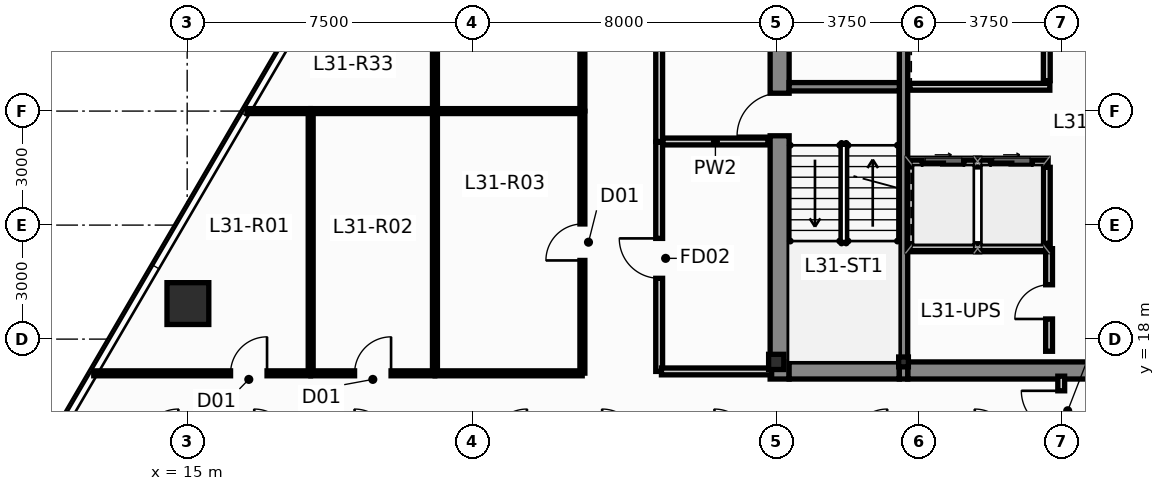
"""IFC4 building model, lengths in metres.
Left out: names, types, materials, properties, quantities, classifications, styles, units other than length and angle.
Written with IfcOpenShell. Run it as: python <this file> out.ifc"""

import sys

from ifc_helpers import new_model, si_unit, direction, frame, frame_2d, origin, origin_2d, place, context, subcontext, project, spatial, rectangle, hollow_rectangle, i_section, extrude, source, transform, mapped, element, fill, save


model = new_model("IFC4")
c1 = context("Model", 3, precision=1e-05, world=origin(), true_north=direction((0.0, 1.0)))
c2 = subcontext(c1, "Body", "Model", "MODEL_VIEW")
j1 = project(units=[si_unit("LENGTHUNIT", "METRE"), si_unit("PLANEANGLEUNIT", "RADIAN")], contexts=[c1])
p1 = place(None, origin())
s1 = spatial("IfcSite", under=j1, at=p1, CompositionType="ELEMENT")
p2 = place(p1, origin())
s2 = spatial("IfcBuilding", under=s1, at=p2, CompositionType="ELEMENT")
p3 = place(p2, frame((0.0, 0.0, 120.0)))
s3 = spatial("IfcBuildingStorey", under=s2, at=p3, CompositionType="ELEMENT", Elevation=120.0)
m1 = source(origin(), c2, "Body", "SweptSolid", [
    extrude(i_section(OverallWidth=0.4, OverallDepth=0.4, WebThickness=0.02, FlangeThickness=0.032, at=origin_2d()), origin(), (0.0, 0.0, 1.0), 3.65),
])
p4 = place(p3, frame((30.5, 17.4, 0.0), z_axis=(0.0, 0.0, 1.0), x_axis=(1.0, 0.0, 0.0)))
e1 = element("IfcColumn", 1, at=p4, inside=s3, PredefinedType="COLUMN", context=c2, shape_type="MappedRepresentation", body=[
    mapped(m1, transform((0.0, 0.0, 0.0), scale=1.0)),
])
m2 = source(origin(), c2, "Body", "SweptSolid", [
    extrude(i_section(OverallWidth=0.256, OverallDepth=0.26, WebThickness=0.01, FlangeThickness=0.017, at=origin_2d()), origin(), (0.0, 0.0, 1.0), 3.65),
])
p5 = place(p3, frame((33.85, 17.4, 0.0), z_axis=(0.0, 0.0, 1.0), x_axis=(1.0, 0.0, 0.0)))
e2 = element("IfcColumn", 2, at=p5, inside=s3, PredefinedType="COLUMN", context=c2, shape_type="MappedRepresentation", body=[
    mapped(m2, transform((0.0, 0.0, 0.0), scale=1.0)),
])
p6 = place(p3, frame((30.59, 16.95, 0.0), z_axis=(0.0, 0.0, 1.0), x_axis=(0.0, 1.0, 0.0)))
e3 = element("IfcWall", 3, at=p6, inside=s3, PredefinedType="SHEAR", context=c2, shape_type="SweptSolid", body=[
    extrude(rectangle(XDim=13.275, YDim=0.5, at=frame_2d((6.638, 0.0))), origin(), (0.0, 0.0, 1.0), 3.65),
])
p7 = place(p6, frame((6.4, 0.0, 0.0)))
e4 = element("IfcOpeningElement", 4, at=p7, cuts=e3, PredefinedType="OPENING", context=c2, shape_type="SweptSolid", body=[
    extrude(rectangle(XDim=1.12, YDim=2.15, at=frame_2d((0.56, 1.075))), frame((0.0, 0.262, 0.0), z_axis=(0.0, -1.0, 0.0), x_axis=(1.0, 0.0, 0.0)), (0.0, 0.0, 1.0), 0.524),
])
p8 = place(p6, frame((10.85, 0.0, 0.0)))
e5 = element("IfcOpeningElement", 5, at=p8, cuts=e3, PredefinedType="OPENING", context=c2, shape_type="SweptSolid", body=[
    extrude(rectangle(XDim=1.2, YDim=2.2, at=frame_2d((0.6, 1.1))), frame((0.0, 0.262, 0.0), z_axis=(0.0, -1.0, 0.0), x_axis=(1.0, 0.0, 0.0)), (0.0, 0.0, 1.0), 0.524),
])
p9 = place(p3, frame((30.84, 17.175, 0.0), z_axis=(0.0, 0.0, 1.0), x_axis=(1.0, 0.0, 0.0)))
e6 = element("IfcWall", 6, at=p9, inside=s3, PredefinedType="SHEAR", context=c2, shape_type="SweptSolid", body=[
    extrude(rectangle(XDim=2.9, YDim=0.45, at=frame_2d((1.45, 0.0))), origin(), (0.0, 0.0, 1.0), 3.65),
])
p10 = place(p3, frame((33.96, 17.175, 0.0), z_axis=(0.0, 0.0, 1.0), x_axis=(1.0, 0.0, 0.0)))
e7 = element("IfcWall", 7, at=p10, inside=s3, PredefinedType="SHEAR", context=c2, shape_type="SweptSolid", body=[
    extrude(rectangle(XDim=8.08, YDim=0.45, at=frame_2d((4.04, 0.0))), origin(), (0.0, 0.0, 1.0), 3.65),
])
p11 = place(p3, frame((33.85, 16.95, 0.0), z_axis=(0.0, 0.0, 1.0), x_axis=(0.0, 1.0, 0.0)))
e8 = element("IfcWall", 8, at=p11, inside=s3, PredefinedType="SHEAR", context=c2, shape_type="SweptSolid", body=[
    extrude(rectangle(XDim=13.275, YDim=0.22, at=frame_2d((6.638, 0.0))), origin(), (0.0, 0.0, 1.0), 3.65),
])
p12 = place(p3, frame((30.84, 24.64, 0.0), z_axis=(0.0, 0.0, 1.0), x_axis=(1.0, 0.0, 0.0)))
e9 = element("IfcWall", 9, at=p12, inside=s3, PredefinedType="SHEAR", context=c2, shape_type="SweptSolid", body=[
    extrude(rectangle(XDim=2.9, YDim=0.22, at=frame_2d((1.45, 0.0))), origin(), (0.0, 0.0, 1.0), 3.65),
])
m3 = source(origin(), c2, "Body", "SweptSolid", [
    extrude(hollow_rectangle(XDim=1.1, YDim=1.1, WallThickness=0.06, at=origin_2d()), origin(), (0.0, 0.0, 1.0), 3.651),
])
p13 = place(p3, frame((15.019, 18.935, 0.0), z_axis=(0.010431780378, -0.021599135014, 0.999712286273), x_axis=(0.900476348161, 0.434904985489, 0.0)))
e10 = element("IfcColumn", 10, at=p13, inside=s3, PredefinedType="COLUMN", context=c2, shape_type="MappedRepresentation", body=[
    mapped(m3, transform((0.0, 0.0, 0.0), scale=1.0)),
])
p14 = place(p3, frame((34.02, 22.62, 0.0), z_axis=(0.0, 0.0, 1.0), x_axis=(1.0, 0.0, 0.0)))
e11 = element("IfcWall", 11, at=p14, inside=s3, PredefinedType="PARTITIONING", context=c2, shape_type="SweptSolid", body=[
    extrude(rectangle(XDim=3.6, YDim=0.18, at=frame_2d((1.8, 0.0))), origin(), (0.0, 0.0, 1.0), 3.4),
])
p15 = place(p14, frame((0.32, 0.0, 0.0)))
e12 = element("IfcOpeningElement", 12, at=p15, cuts=e11, PredefinedType="OPENING", context=c2, shape_type="SweptSolid", body=[
    extrude(rectangle(XDim=1.1, YDim=2.2, at=frame_2d((0.55, 1.1))), frame((0.0, 0.102, 0.0), z_axis=(0.0, -1.0, 0.0), x_axis=(1.0, 0.0, 0.0)), (0.0, 0.0, 1.0), 0.204),
])
p16 = place(p14, frame((2.12, 0.0, 0.0)))
e13 = element("IfcOpeningElement", 13, at=p16, cuts=e11, PredefinedType="OPENING", context=c2, shape_type="SweptSolid", body=[
    extrude(rectangle(XDim=1.1, YDim=2.2, at=frame_2d((0.55, 1.1))), frame((0.0, 0.102, 0.0), z_axis=(0.0, -1.0, 0.0), x_axis=(1.0, 0.0, 0.0)), (0.0, 0.0, 1.0), 0.204),
])
for number, where, z_axis, x_axis in (
    (14, (37.62, 20.52, 0.0), (0.0, 0.0, 1.0), (0.0, 1.0, 0.0)),
    (15, (37.62, 24.8, 0.0), (0.0, 0.0, 1.0), (0.0, 1.0, 0.0)),
):
    element("IfcWall", number, at=place(p3, frame(where, z_axis=z_axis, x_axis=x_axis)), inside=s3, PredefinedType="PARTITIONING", context=c2, shape_type="SweptSolid", body=[
        extrude(rectangle(XDim=2.0, YDim=0.18, at=frame_2d((1.0, 0.0))), origin(), (0.0, 0.0, 1.0), 3.4),
    ])
p17 = place(p3, frame((34.02, 24.64, 0.0), z_axis=(0.0, 0.0, 1.0), x_axis=(1.0, 0.0, 0.0)))
e16 = element("IfcWall", 16, at=p17, inside=s3, PredefinedType="PARTITIONING", context=c2, shape_type="SweptSolid", body=[
    extrude(rectangle(XDim=3.68, YDim=0.18, at=frame_2d((1.84, 0.0))), origin(), (0.0, 0.0, 1.0), 3.4),
])
p18 = place(p3, frame((27.42, 23.2, 0.0), z_axis=(0.0, 0.0, 1.0), x_axis=(0.0, 1.0, 0.0)))
e17 = element("IfcWall", 17, at=p18, inside=s3, PredefinedType="PARTITIONING", context=c2, shape_type="SweptSolid", body=[
    extrude(rectangle(XDim=6.4, YDim=0.18, at=frame_2d((3.2, 0.0))), origin(), (0.0, 0.0, 1.0), 3.026),
])
p19 = place(p18, frame((2.65, 0.0, 0.0)))
e18 = element("IfcOpeningElement", 18, at=p19, cuts=e17, PredefinedType="OPENING", context=c2, shape_type="SweptSolid", body=[
    extrude(rectangle(XDim=1.05, YDim=2.15, at=frame_2d((0.525, 1.075))), frame((0.0, 0.102, 0.0), z_axis=(0.0, -1.0, 0.0), x_axis=(1.0, 0.0, 0.0)), (0.0, 0.0, 1.0), 0.204),
])
p20 = place(p3, frame((27.52, 23.2, 0.0), z_axis=(0.0, 0.0, 1.0), x_axis=(1.0, 0.0, 0.0)))
e19 = element("IfcWall", 19, at=p20, inside=s3, PredefinedType="PARTITIONING", context=c2, shape_type="SweptSolid", body=[
    extrude(rectangle(XDim=2.76, YDim=0.18, at=frame_2d((1.38, 0.0))), origin(), (0.0, 0.0, 1.0), 3.4),
])
p21 = place(p3, frame((34.02, 20.42, 0.0), z_axis=(0.0, 0.0, 1.0), x_axis=(1.0, 0.0, 0.0)))
e20 = element("IfcWall", 20, at=p21, inside=s3, PredefinedType="PARTITIONING", context=c2, shape_type="SweptSolid", body=[
    extrude(rectangle(XDim=3.64, YDim=0.18, at=frame_2d((1.82, 0.0))), origin(), (0.0, 0.0, 1.0), 3.4),
])
p22 = place(p3, frame((37.68, 17.68, 0.0), z_axis=(0.0, 0.0, 1.0), x_axis=(0.0, 1.0, 0.0)))
e21 = element("IfcWall", 21, at=p22, inside=s3, PredefinedType="PARTITIONING", context=c2, shape_type="SweptSolid", body=[
    extrude(rectangle(XDim=2.7, YDim=0.18, at=frame_2d((1.35, 0.0))), origin(), (0.0, 0.0, 1.0), 3.4),
])
p23 = place(p22, frame((0.85, 0.0, 0.0)))
e22 = element("IfcOpeningElement", 22, at=p23, cuts=e21, PredefinedType="OPENING", context=c2, shape_type="SweptSolid", body=[
    extrude(rectangle(XDim=0.9, YDim=2.1, at=frame_2d((0.45, 1.05))), frame((0.0, 0.102, 0.0), z_axis=(0.0, -1.0, 0.0), x_axis=(1.0, 0.0, 0.0)), (0.0, 0.0, 1.0), 0.204),
])
p24 = place(p3, frame((27.42, 17.15, 0.0), z_axis=(0.0, 0.0, 1.0), x_axis=(0.0, 1.0, 0.0)))
e23 = element("IfcWall", 23, at=p24, inside=s3, PredefinedType="PARTITIONING", context=c2, shape_type="SweptSolid", body=[
    extrude(rectangle(XDim=6.03, YDim=0.18, at=frame_2d((3.015, 0.0))), origin(), (0.0, 0.0, 1.0), 3.4),
])
p25 = place(p24, frame((2.45, 0.0, 0.0)))
e24 = element("IfcOpeningElement", 24, at=p25, cuts=e23, PredefinedType="OPENING", context=c2, shape_type="SweptSolid", body=[
    extrude(rectangle(XDim=1.05, YDim=2.15, at=frame_2d((0.525, 1.075))), frame((0.0, 0.102, 0.0), z_axis=(0.0, -1.0, 0.0), x_axis=(1.0, 0.0, 0.0)), (0.0, 0.0, 1.0), 0.204),
])
p26 = place(p3, frame((27.48, 17.15, 0.0), z_axis=(0.0, 0.0, 1.0), x_axis=(1.0, 0.0, 0.0)))
e25 = element("IfcWall", 25, at=p26, inside=s3, PredefinedType="PARTITIONING", context=c2, shape_type="SweptSolid", body=[
    extrude(rectangle(XDim=2.9, YDim=0.18, at=frame_2d((1.45, 0.0))), origin(), (0.0, 0.0, 1.0), 2.783),
])
p27 = place(p3, frame((25.4, 17.105, 0.0), z_axis=(0.0, 0.0, 1.0), x_axis=(0.0, 1.0, 0.0)))
e26 = element("IfcWall", 26, at=p27, inside=s3, PredefinedType="PARTITIONING", context=c2, shape_type="SweptSolid", body=[
    extrude(rectangle(XDim=6.89, YDim=0.13, at=frame_2d((3.445, 0.0))), origin(), (0.0, 0.0, 1.0), 3.026),
])
p28 = place(p27, frame((2.965, 0.0, 0.0)))
e27 = element("IfcOpeningElement", 27, at=p28, cuts=e26, PredefinedType="OPENING", context=c2, shape_type="SweptSolid", body=[
    extrude(rectangle(XDim=0.96, YDim=2.15, at=frame_2d((0.48, 1.075))), frame((0.0, 0.077, 0.0), z_axis=(0.0, -1.0, 0.0), x_axis=(1.0, 0.0, 0.0)), (0.0, 0.0, 1.0), 0.154),
])
p29 = place(p3, frame((18.25, 17.105, 0.0), z_axis=(0.0, 0.0, 1.0), x_axis=(0.0, 1.0, 0.0)))
e28 = element("IfcWall", 28, at=p29, inside=s3, PredefinedType="PARTITIONING", context=c2, shape_type="SweptSolid", body=[
    extrude(rectangle(XDim=6.89, YDim=0.13, at=frame_2d((3.445, 0.0))), origin(), (0.0, 0.0, 1.0), 3.4),
])
p30 = place(p3, frame((21.52, 17.105, 0.0), z_axis=(0.0, 0.0, 1.0), x_axis=(0.0, 1.0, 0.0)))
e29 = element("IfcWall", 29, at=p30, inside=s3, PredefinedType="PARTITIONING", context=c2, shape_type="SweptSolid", body=[
    extrude(rectangle(XDim=6.89, YDim=0.13, at=frame_2d((3.445, 0.0))), origin(), (0.0, 0.0, 1.0), 3.026),
])
p31 = place(p3, frame((25.4, 24.005, 0.0), z_axis=(0.0, 0.0, 1.0), x_axis=(0.0, 1.0, 0.0)))
e30 = element("IfcWall", 30, at=p31, inside=s3, PredefinedType="PARTITIONING", context=c2, shape_type="SweptSolid", body=[
    extrude(rectangle(XDim=6.09, YDim=0.13, at=frame_2d((3.045, 0.0))), origin(), (0.0, 0.0, 1.0), 3.026),
])
p32 = place(p31, frame((2.565, 0.0, 0.0)))
e31 = element("IfcOpeningElement", 31, at=p32, cuts=e30, PredefinedType="OPENING", context=c2, shape_type="SweptSolid", body=[
    extrude(rectangle(XDim=0.96, YDim=2.15, at=frame_2d((0.48, 1.075))), frame((0.0, 0.077, 0.0), z_axis=(0.0, -1.0, 0.0), x_axis=(1.0, 0.0, 0.0)), (0.0, 0.0, 1.0), 0.154),
])
p33 = place(p3, frame((21.52, 24.005, 0.0), z_axis=(0.0, 0.0, 1.0), x_axis=(0.0, 1.0, 0.0)))
e32 = element("IfcWall", 32, at=p33, inside=s3, PredefinedType="PARTITIONING", context=c2, shape_type="SweptSolid", body=[
    extrude(rectangle(XDim=6.09, YDim=0.13, at=frame_2d((3.045, 0.0))), origin(), (0.0, 0.0, 1.0), 3.026),
])
p34 = place(p33, frame((2.16, 0.0, 0.0)))
e33 = element("IfcOpeningElement", 33, at=p34, cuts=e32, PredefinedType="OPENING", context=c2, shape_type="SweptSolid", body=[
    extrude(rectangle(XDim=0.96, YDim=2.15, at=frame_2d((0.48, 1.075))), frame((0.0, 0.077, 0.0), z_axis=(0.0, -1.0, 0.0), x_axis=(1.0, 0.0, 0.0)), (0.0, 0.0, 1.0), 0.154),
])
p35 = place(p3, frame((12.542, 17.1, 0.0), z_axis=(0.0, 0.0, 1.0), x_axis=(1.0, 0.0, 0.0)))
e34 = element("IfcWall", 34, at=p35, inside=s3, PredefinedType="PARTITIONING", context=c2, shape_type="SweptSolid", body=[
    extrude(rectangle(XDim=5.704, YDim=0.13, at=frame_2d((2.852, 0.0))), origin(), (0.0, 0.0, 1.0), 3.4),
])
p36 = place(p35, frame((3.6, 0.0, 0.0)))
e35 = element("IfcOpeningElement", 35, at=p36, cuts=e34, PredefinedType="OPENING", context=c2, shape_type="SweptSolid", body=[
    extrude(rectangle(XDim=0.96, YDim=2.15, at=frame_2d((0.48, 1.075))), frame((0.0, 0.077, 0.0), z_axis=(0.0, -1.0, 0.0), x_axis=(1.0, 0.0, 0.0)), (0.0, 0.0, 1.0), 0.154),
])
for number, where, z_axis, x_axis in (
    (36, (21.525, 17.1, 0.0), (0.0, 0.0, 1.0), (1.0, 0.0, 0.0)),
    (37, (21.525, 24.0, 0.0), (0.0, 0.0, 1.0), (1.0, 0.0, 0.0)),
):
    element("IfcWall", number, at=place(p3, frame(where, z_axis=z_axis, x_axis=x_axis)), inside=s3, PredefinedType="PARTITIONING", context=c2, shape_type="SweptSolid", body=[
        extrude(rectangle(XDim=3.87, YDim=0.13, at=frame_2d((1.935, 0.0))), origin(), (0.0, 0.0, 1.0), 3.4),
    ])
p37 = place(p3, frame((18.255, 17.1, 0.0), z_axis=(0.0, 0.0, 1.0), x_axis=(1.0, 0.0, 0.0)))
e38 = element("IfcWall", 38, at=p37, inside=s3, PredefinedType="PARTITIONING", context=c2, shape_type="SweptSolid", body=[
    extrude(rectangle(XDim=3.26, YDim=0.13, at=frame_2d((1.63, 0.0))), origin(), (0.0, 0.0, 1.0), 3.4),
])
p38 = place(p37, frame((1.15, 0.0, 0.0)))
e39 = element("IfcOpeningElement", 39, at=p38, cuts=e38, PredefinedType="OPENING", context=c2, shape_type="SweptSolid", body=[
    extrude(rectangle(XDim=0.96, YDim=2.15, at=frame_2d((0.48, 1.075))), frame((0.0, 0.077, 0.0), z_axis=(0.0, -1.0, 0.0), x_axis=(1.0, 0.0, 0.0)), (0.0, 0.0, 1.0), 0.154),
])
p39 = place(p3, frame((18.255, 24.0, 0.0), z_axis=(0.0, 0.0, 1.0), x_axis=(1.0, 0.0, 0.0)))
e40 = element("IfcWall", 40, at=p39, inside=s3, PredefinedType="PARTITIONING", context=c2, shape_type="SweptSolid", body=[
    extrude(rectangle(XDim=3.26, YDim=0.13, at=frame_2d((1.63, 0.0))), origin(), (0.0, 0.0, 1.0), 3.4),
])
p40 = place(p3, frame((38.0, 15.205, 0.0), z_axis=(0.0, 0.0, 1.0), x_axis=(0.0, 1.0, 0.0)))
e41 = element("IfcWall", 41, at=p40, inside=s3, PredefinedType="PARTITIONING", context=c2, shape_type="SweptSolid", body=[
    extrude(rectangle(XDim=1.82, YDim=0.18, at=frame_2d((0.91, 0.0))), origin(), (0.0, 0.0, 1.0), 3.4),
])
p41 = place(p40, frame((0.385, 0.0, 0.0)))
e42 = element("IfcOpeningElement", 42, at=p41, cuts=e41, PredefinedType="OPENING", context=c2, shape_type="SweptSolid", body=[
    extrude(rectangle(XDim=1.05, YDim=2.15, at=frame_2d((0.525, 1.075))), frame((0.0, 0.102, 0.0), z_axis=(0.0, -1.0, 0.0), x_axis=(1.0, 0.0, 0.0)), (0.0, 0.0, 1.0), 0.204),
])
p42 = place(p3, frame((16.573, 24.0, 0.0), z_axis=(0.0, 0.0, 1.0), x_axis=(1.0, 0.0, 0.0)))
e43 = element("IfcWall", 43, at=p42, inside=s3, PredefinedType="PARTITIONING", context=c2, shape_type="SweptSolid", body=[
    extrude(rectangle(XDim=1.672, YDim=0.13, at=frame_2d((0.836, 0.0))), origin(), (0.0, 0.0, 1.0), 3.4),
])
p43 = place(p7, origin())
e44 = element("IfcDoor", 44, at=p43, inside=s3, OperationType="SINGLE_SWING_LEFT", PredefinedType="DOOR", context=c2, shape_type="SweptSolid", body=[
    extrude(rectangle(XDim=1.12, YDim=2.15, at=frame_2d((0.56, 1.075))), frame((0.0, 0.025, 0.0), z_axis=(0.0, -1.0, 0.0), x_axis=(1.0, 0.0, 0.0)), (0.0, 0.0, 1.0), 0.05),
])
fill(e4, e44)
p44 = place(p15, origin())
e45 = element("IfcDoor", 45, at=p44, inside=s3, OperationType="SLIDING_TO_LEFT", PredefinedType="DOOR", context=c2, shape_type="SweptSolid", body=[
    extrude(rectangle(XDim=1.1, YDim=2.2, at=frame_2d((0.55, 1.1))), frame((0.0, 0.025, 0.0), z_axis=(0.0, -1.0, 0.0), x_axis=(1.0, 0.0, 0.0)), (0.0, 0.0, 1.0), 0.05),
])
fill(e12, e45)
p45 = place(p16, origin())
e46 = element("IfcDoor", 46, at=p45, inside=s3, OperationType="SLIDING_TO_RIGHT", PredefinedType="DOOR", context=c2, shape_type="SweptSolid", body=[
    extrude(rectangle(XDim=1.1, YDim=2.2, at=frame_2d((0.55, 1.1))), frame((0.0, 0.025, 0.0), z_axis=(0.0, -1.0, 0.0), x_axis=(1.0, 0.0, 0.0)), (0.0, 0.0, 1.0), 0.05),
])
fill(e13, e46)
p46 = place(p23, origin())
e47 = element("IfcDoor", 47, at=p46, inside=s3, OperationType="SINGLE_SWING_LEFT", PredefinedType="DOOR", context=c2, shape_type="SweptSolid", body=[
    extrude(rectangle(XDim=0.9, YDim=2.1, at=frame_2d((0.45, 1.05))), frame((0.0, 0.025, 0.0), z_axis=(0.0, -1.0, 0.0), x_axis=(1.0, 0.0, 0.0)), (0.0, 0.0, 1.0), 0.05),
])
fill(e22, e47)
p47 = place(p25, origin())
e48 = element("IfcDoor", 48, at=p47, inside=s3, OperationType="SINGLE_SWING_RIGHT", PredefinedType="DOOR", context=c2, shape_type="SweptSolid", body=[
    extrude(rectangle(XDim=1.05, YDim=2.15, at=frame_2d((0.525, 1.075))), frame((0.0, 0.025, 0.0), z_axis=(0.0, -1.0, 0.0), x_axis=(1.0, 0.0, 0.0)), (0.0, 0.0, 1.0), 0.05),
])
fill(e24, e48)
p48 = place(p28, origin())
e49 = element("IfcDoor", 49, at=p48, inside=s3, OperationType="SINGLE_SWING_LEFT", PredefinedType="DOOR", context=c2, shape_type="SweptSolid", body=[
    extrude(rectangle(XDim=0.96, YDim=2.15, at=frame_2d((0.48, 1.075))), frame((0.0, 0.025, 0.0), z_axis=(0.0, -1.0, 0.0), x_axis=(1.0, 0.0, 0.0)), (0.0, 0.0, 1.0), 0.05),
])
fill(e27, e49)
p49 = place(p36, origin())
e50 = element("IfcDoor", 50, at=p49, inside=s3, OperationType="SINGLE_SWING_RIGHT", PredefinedType="DOOR", context=c2, shape_type="SweptSolid", body=[
    extrude(rectangle(XDim=0.96, YDim=2.15, at=frame_2d((0.48, 1.075))), frame((0.0, 0.025, 0.0), z_axis=(0.0, -1.0, 0.0), x_axis=(1.0, 0.0, 0.0)), (0.0, 0.0, 1.0), 0.05),
])
fill(e35, e50)
p50 = place(p38, origin())
e51 = element("IfcDoor", 51, at=p50, inside=s3, OperationType="SINGLE_SWING_RIGHT", PredefinedType="DOOR", context=c2, shape_type="SweptSolid", body=[
    extrude(rectangle(XDim=0.96, YDim=2.15, at=frame_2d((0.48, 1.075))), frame((0.0, 0.025, 0.0), z_axis=(0.0, -1.0, 0.0), x_axis=(1.0, 0.0, 0.0)), (0.0, 0.0, 1.0), 0.05),
])
fill(e39, e51)
p51 = place(p41, origin())
e52 = element("IfcDoor", 52, at=p51, inside=s3, OperationType="SINGLE_SWING_RIGHT", PredefinedType="DOOR", context=c2, shape_type="SweptSolid", body=[
    extrude(rectangle(XDim=1.05, YDim=2.15, at=frame_2d((0.525, 1.075))), frame((0.0, 0.025, 0.0), z_axis=(0.0, -1.0, 0.0), x_axis=(1.0, 0.0, 0.0)), (0.0, 0.0, 1.0), 0.05),
])
fill(e42, e52)
save(model, sys.argv[1])
